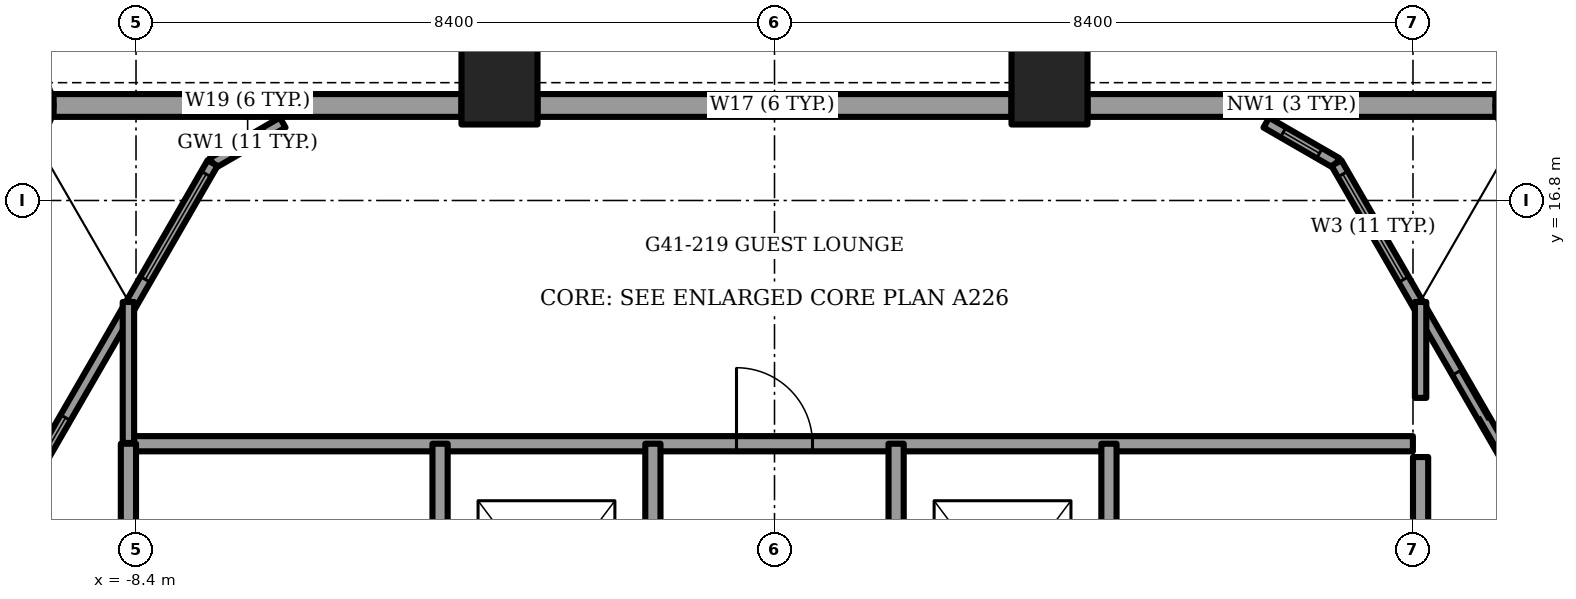
"""IFC4 building model, lengths in metres.
Left out: names, types, materials, properties, quantities, classifications, styles, units other than length and angle.
Written with IfcOpenShell. Run it as: python <this file> out.ifc"""

import sys

from ifc_helpers import new_model, si_unit, direction, frame, frame_2d, origin, origin_2d, place, context, subcontext, project, spatial, rectangle, circle, extrude, element, fill, save


model = new_model("IFC4")
c1 = context("Model", 3, precision=1e-05, world=origin(), true_north=direction((0.0, 1.0)))
c2 = subcontext(c1, "Body", "Model", "MODEL_VIEW")
j1 = project(units=[si_unit("LENGTHUNIT", "METRE"), si_unit("PLANEANGLEUNIT", "RADIAN")], contexts=[c1])
p1 = place(None, origin())
s1 = spatial("IfcSite", under=j1, at=p1, CompositionType="ELEMENT")
p2 = place(p1, origin())
s2 = spatial("IfcBuilding", under=s1, at=p2, CompositionType="ELEMENT")
p3 = place(p2, frame((0.0, 0.0, 168.25)))
s3 = spatial("IfcBuildingStorey", under=s2, at=p3, CompositionType="ELEMENT", Elevation=168.25)
for number, where, z_axis, x_axis in (
    (1, (-9.984, 18.045, -1.2), (0.0, 0.0, 1.0), (1.0, 0.0, 0.0)),
    (2, (9.984, 18.045, -1.2), (0.0, 0.0, 1.0), (1.0, 0.0, 0.0)),
):
    element("IfcColumn", number, at=place(p3, frame(where, z_axis=z_axis, x_axis=x_axis)), inside=s3, PredefinedType="COLUMN", context=c2, shape_type="SweptSolid", body=[
        extrude(circle(Radius=0.5, at=origin_2d()), origin(), (0.0, 0.0, 1.0), 3.75),
    ])
for number, where, z_axis, x_axis in (
    (3, (3.618, 18.3, -1.2), (0.0, 0.0, 1.0), (1.0, 0.0, 0.0)),
    (4, (-3.618, 18.3, -1.2), (0.0, 0.0, 1.0), (1.0, 0.0, 0.0)),
):
    element("IfcColumn", number, at=place(p3, frame(where, z_axis=z_axis, x_axis=x_axis)), inside=s3, PredefinedType="COLUMN", context=c2, shape_type="SweptSolid", body=[
        extrude(rectangle(XDim=1.0, YDim=1.0, at=origin_2d()), origin(), (0.0, 0.0, 1.0), 3.75),
    ])
p4 = place(p3, frame((9.484, 18.05, 0.0), z_axis=(0.0, 0.0, 1.0), x_axis=(-1.0, 0.0, 0.0)))
e5 = element("IfcWall", 5, at=p4, inside=s3, PredefinedType="SOLIDWALL", context=c2, shape_type="SweptSolid", body=[
    extrude(rectangle(XDim=5.366, YDim=0.3, at=frame_2d((2.683, 0.0))), origin(), (0.0, 0.0, 1.0), 2.55),
])
p5 = place(p3, frame((3.118, 18.05, 0.0), z_axis=(0.0, 0.0, 1.0), x_axis=(-1.0, 0.0, 0.0)))
e6 = element("IfcWall", 6, at=p5, inside=s3, PredefinedType="SOLIDWALL", context=c2, shape_type="SweptSolid", body=[
    extrude(rectangle(XDim=6.236, YDim=0.3, at=frame_2d((3.118, 0.0))), origin(), (0.0, 0.0, 1.0), 2.55),
])
p6 = place(p5, frame((2.7, 0.0, 0.15)))
e7 = element("IfcOpeningElement", 7, at=p6, cuts=e6, PredefinedType="OPENING", context=c2, shape_type="SweptSolid", body=[
    extrude(rectangle(XDim=0.9, YDim=2.15, at=frame_2d((0.45, 1.075))), frame((0.0, 0.15, 0.0), z_axis=(0.0, -1.0, 0.0), x_axis=(1.0, 0.0, 0.0)), (0.0, 0.0, 1.0), 0.3),
])
p7 = place(p3, frame((-4.118, 18.05, 0.0), z_axis=(0.0, 0.0, 1.0), x_axis=(-1.0, 0.0, 0.0)))
e8 = element("IfcWall", 8, at=p7, inside=s3, PredefinedType="SOLIDWALL", context=c2, shape_type="SweptSolid", body=[
    extrude(rectangle(XDim=5.366, YDim=0.3, at=frame_2d((2.683, 0.0))), origin(), (0.0, 0.0, 1.0), 2.55),
])
p8 = place(p3, frame((-7.393, 17.292, 0.0), z_axis=(0.0, 0.0, 1.0), x_axis=(-0.500001917853, -0.866024296509, 0.0)))
e9 = element("IfcWall", 9, at=p8, inside=s3, PredefinedType="SOLIDWALL", context=c2, shape_type="SweptSolid", body=[
    extrude(rectangle(XDim=19.788, YDim=0.15, at=frame_2d((9.894, 0.0))), origin(), (0.0, 0.0, 1.0), 3.45),
])
p9 = place(p8, frame((3.868, 0.0, 0.15)))
e10 = element("IfcOpeningElement", 10, at=p9, cuts=e9, PredefinedType="OPENING", context=c2, shape_type="SweptSolid", body=[
    extrude(rectangle(XDim=1.4, YDim=2.85, at=frame_2d((0.7, 1.425))), frame((0.0, 0.075, 0.0), z_axis=(0.0, -1.0, 0.0), x_axis=(1.0, 0.0, 0.0)), (0.0, 0.0, 1.0), 0.15),
])
p10 = place(p8, frame((10.067, 0.0, 0.15)))
e11 = element("IfcOpeningElement", 11, at=p10, cuts=e9, PredefinedType="OPENING", context=c2, shape_type="SweptSolid", body=[
    extrude(rectangle(XDim=0.9, YDim=2.85, at=frame_2d((0.45, 1.425))), frame((0.0, 0.075, 0.0), z_axis=(0.0, -1.0, 0.0), x_axis=(1.0, 0.0, 0.0)), (0.0, 0.0, 1.0), 0.15),
])
p11 = place(p8, frame((7.967, 0.0, 0.15)))
e12 = element("IfcOpeningElement", 12, at=p11, cuts=e9, PredefinedType="OPENING", context=c2, shape_type="SweptSolid", body=[
    extrude(rectangle(XDim=1.4, YDim=2.85, at=frame_2d((0.7, 1.425))), frame((0.0, 0.075, 0.0), z_axis=(0.0, -1.0, 0.0), x_axis=(1.0, 0.0, 0.0)), (0.0, 0.0, 1.0), 0.15),
])
p12 = place(p8, frame((13.779, 0.0, 0.0)))
e13 = element("IfcOpeningElement", 13, at=p12, cuts=e9, PredefinedType="OPENING", context=c2, shape_type="SweptSolid", body=[
    extrude(rectangle(XDim=1.4, YDim=2.4, at=frame_2d((0.7, 1.2))), frame((0.0, 0.075, 0.0), z_axis=(0.0, -1.0, 0.0), x_axis=(1.0, 0.0, 0.0)), (0.0, 0.0, 1.0), 0.15),
])
p13 = place(p8, frame((17.979, 0.0, 0.0)))
e14 = element("IfcOpeningElement", 14, at=p13, cuts=e9, PredefinedType="OPENING", context=c2, shape_type="SweptSolid", body=[
    extrude(rectangle(XDim=1.4, YDim=2.4, at=frame_2d((0.7, 1.2))), frame((0.0, 0.075, 0.0), z_axis=(0.0, -1.0, 0.0), x_axis=(1.0, 0.0, 0.0)), (0.0, 0.0, 1.0), 0.15),
])
p14 = place(p8, frame((0.168, 0.0, 0.15)))
e15 = element("IfcOpeningElement", 15, at=p14, cuts=e9, PredefinedType="OPENING", context=c2, shape_type="SweptSolid", body=[
    extrude(rectangle(XDim=1.6, YDim=2.73, at=frame_2d((0.8, 1.365))), frame((0.0, 0.075, 0.0), z_axis=(0.0, -1.0, 0.0), x_axis=(1.0, 0.0, 0.0)), (0.0, 0.0, 1.0), 0.15),
])
p15 = place(p3, frame((17.287, 0.156, 0.0), z_axis=(0.0, 0.0, 1.0), x_axis=(-0.500001917853, 0.866024296509, 0.0)))
e16 = element("IfcWall", 16, at=p15, inside=s3, PredefinedType="SOLIDWALL", context=c2, shape_type="SweptSolid", body=[
    extrude(rectangle(XDim=19.788, YDim=0.15, at=frame_2d((9.894, 0.0))), origin(), (0.0, 0.0, 1.0), 3.45),
])
p16 = place(p15, frame((1.046, 0.0, 0.15)))
e17 = element("IfcOpeningElement", 17, at=p16, cuts=e16, PredefinedType="OPENING", context=c2, shape_type="SweptSolid", body=[
    extrude(rectangle(XDim=1.4, YDim=2.85, at=frame_2d((0.7, 1.425))), frame((0.0, 0.075, 0.0), z_axis=(0.0, -1.0, 0.0), x_axis=(1.0, 0.0, 0.0)), (0.0, 0.0, 1.0), 0.15),
])
p17 = place(p15, frame((4.608, 0.0, 0.15)))
e18 = element("IfcOpeningElement", 18, at=p17, cuts=e16, PredefinedType="OPENING", context=c2, shape_type="SweptSolid", body=[
    extrude(rectangle(XDim=0.9, YDim=2.85, at=frame_2d((0.45, 1.425))), frame((0.0, 0.075, 0.0), z_axis=(0.0, -1.0, 0.0), x_axis=(1.0, 0.0, 0.0)), (0.0, 0.0, 1.0), 0.15),
])
p18 = place(p15, frame((5.896, 0.0, 0.15)))
e19 = element("IfcOpeningElement", 19, at=p18, cuts=e16, PredefinedType="OPENING", context=c2, shape_type="SweptSolid", body=[
    extrude(rectangle(XDim=1.4, YDim=2.85, at=frame_2d((0.7, 1.425))), frame((0.0, 0.075, 0.0), z_axis=(0.0, -1.0, 0.0), x_axis=(1.0, 0.0, 0.0)), (0.0, 0.0, 1.0), 0.15),
])
p19 = place(p15, frame((8.808, 0.0, 0.15)))
e20 = element("IfcOpeningElement", 20, at=p19, cuts=e16, PredefinedType="OPENING", context=c2, shape_type="SweptSolid", body=[
    extrude(rectangle(XDim=1.6, YDim=2.85, at=frame_2d((0.8, 1.425))), frame((0.0, 0.075, 0.0), z_axis=(0.0, -1.0, 0.0), x_axis=(1.0, 0.0, 0.0)), (0.0, 0.0, 1.0), 0.15),
])
p20 = place(p15, frame((11.008, 0.0, 0.15)))
e21 = element("IfcOpeningElement", 21, at=p20, cuts=e16, PredefinedType="OPENING", context=c2, shape_type="SweptSolid", body=[
    extrude(rectangle(XDim=1.4, YDim=2.85, at=frame_2d((0.7, 1.425))), frame((0.0, 0.075, 0.0), z_axis=(0.0, -1.0, 0.0), x_axis=(1.0, 0.0, 0.0)), (0.0, 0.0, 1.0), 0.15),
])
p21 = place(p15, frame((15.208, 0.0, 0.0)))
e22 = element("IfcOpeningElement", 22, at=p21, cuts=e16, PredefinedType="OPENING", context=c2, shape_type="SweptSolid", body=[
    extrude(rectangle(XDim=1.4, YDim=2.4, at=frame_2d((0.7, 1.2))), frame((0.0, 0.075, 0.0), z_axis=(0.0, -1.0, 0.0), x_axis=(1.0, 0.0, 0.0)), (0.0, 0.0, 1.0), 0.15),
])
p22 = place(p15, frame((18.019, 0.0, 0.15)))
e23 = element("IfcOpeningElement", 23, at=p22, cuts=e16, PredefinedType="OPENING", context=c2, shape_type="SweptSolid", body=[
    extrude(rectangle(XDim=1.6, YDim=2.73, at=frame_2d((0.8, 1.365))), frame((0.0, 0.075, 0.0), z_axis=(0.0, -1.0, 0.0), x_axis=(1.0, 0.0, 0.0)), (0.0, 0.0, 1.0), 0.15),
])
p23 = place(p3, frame((-6.47, 17.825, 0.0), z_axis=(0.0, 0.0, 1.0), x_axis=(-0.866048165231, -0.499960573946, 0.0)))
e24 = element("IfcWall", 24, at=p23, inside=s3, PredefinedType="SOLIDWALL", context=c2, shape_type="SweptSolid", body=[
    extrude(rectangle(XDim=1.065, YDim=0.15, at=frame_2d((0.532, 0.0))), origin(), (0.0, 0.0, 1.0), 3.45),
])
p24 = place(p23, frame((0.258, 0.0, 0.15)))
e25 = element("IfcOpeningElement", 25, at=p24, cuts=e24, PredefinedType="OPENING", context=c2, shape_type="SweptSolid", body=[
    extrude(rectangle(XDim=0.55, YDim=2.85, at=frame_2d((0.275, 1.425))), frame((0.0, 0.075, 0.0), z_axis=(0.0, -1.0, 0.0), x_axis=(1.0, 0.0, 0.0)), (0.0, 0.0, 1.0), 0.15),
])
p25 = place(p3, frame((7.393, 17.292, 0.0), z_axis=(0.0, 0.0, 1.0), x_axis=(-0.866048165231, 0.499960573946, 0.0)))
e26 = element("IfcWall", 26, at=p25, inside=s3, PredefinedType="SOLIDWALL", context=c2, shape_type="SweptSolid", body=[
    extrude(rectangle(XDim=1.065, YDim=0.15, at=frame_2d((0.532, 0.0))), origin(), (0.0, 0.0, 1.0), 3.45),
])
p26 = place(p25, frame((0.258, 0.0, 0.15)))
e27 = element("IfcOpeningElement", 27, at=p26, cuts=e26, PredefinedType="OPENING", context=c2, shape_type="SweptSolid", body=[
    extrude(rectangle(XDim=0.55, YDim=2.85, at=frame_2d((0.275, 1.425))), frame((0.0, 0.075, 0.0), z_axis=(0.0, -1.0, 0.0), x_axis=(1.0, 0.0, 0.0)), (0.0, 0.0, 1.0), 0.15),
])
p27 = place(p3, frame((-8.5, 13.6, 0.0), z_axis=(0.0, 0.0, 1.0), x_axis=(1.0, 0.0, 0.0)))
e28 = element("IfcWall", 28, at=p27, inside=s3, PredefinedType="PARTITIONING", context=c2, shape_type="SweptSolid", body=[
    extrude(rectangle(XDim=16.899, YDim=0.2, at=frame_2d((8.449, 0.0))), origin(), (0.0, 0.0, 1.0), 3.45),
])
p28 = place(p27, frame((8.0, 0.0, 0.0)))
e29 = element("IfcOpeningElement", 29, at=p28, cuts=e28, PredefinedType="OPENING", context=c2, shape_type="SweptSolid", body=[
    extrude(rectangle(XDim=1.0, YDim=2.1, at=frame_2d((0.5, 1.05))), frame((0.0, 0.1, 0.0), z_axis=(0.0, -1.0, 0.0), x_axis=(1.0, 0.0, 0.0)), (0.0, 0.0, 1.0), 0.2),
])
p29 = place(p3, frame((-8.5, 9.7, 0.0), z_axis=(0.0, 0.0, 1.0), x_axis=(0.0, 1.0, 0.0)))
e30 = element("IfcWall", 30, at=p29, inside=s3, PredefinedType="PARTITIONING", context=c2, shape_type="SweptSolid", body=[
    extrude(rectangle(XDim=3.9, YDim=0.2, at=frame_2d((1.95, 0.0))), origin(), (0.0, 0.0, 1.0), 3.45),
])
p30 = place(p29, frame((1.35, 0.0, 0.0)))
e31 = element("IfcOpeningElement", 31, at=p30, cuts=e30, PredefinedType="OPENING", context=c2, shape_type="SweptSolid", body=[
    extrude(rectangle(XDim=1.2, YDim=2.1, at=frame_2d((0.6, 1.05))), frame((0.0, 0.1, 0.0), z_axis=(0.0, -1.0, 0.0), x_axis=(1.0, 0.0, 0.0)), (0.0, 0.0, 1.0), 0.2),
])
p31 = place(p3, frame((8.5, 9.7, 0.0), z_axis=(0.0, 0.0, 1.0), x_axis=(0.0, 1.0, 0.0)))
e32 = element("IfcWall", 32, at=p31, inside=s3, PredefinedType="PARTITIONING", context=c2, shape_type="SweptSolid", body=[
    extrude(rectangle(XDim=3.725, YDim=0.2, at=frame_2d((1.862, 0.0))), origin(), (0.0, 0.0, 1.0), 3.45),
])
p32 = place(p31, frame((1.35, 0.0, 0.0)))
e33 = element("IfcOpeningElement", 33, at=p32, cuts=e32, PredefinedType="OPENING", context=c2, shape_type="SweptSolid", body=[
    extrude(rectangle(XDim=1.2, YDim=2.1, at=frame_2d((0.6, 1.05))), frame((0.0, 0.1, 0.0), z_axis=(0.0, -1.0, 0.0), x_axis=(1.0, 0.0, 0.0)), (0.0, 0.0, 1.0), 0.2),
])
p33 = place(p3, frame((-4.4, 9.7, 0.0), z_axis=(0.0, 0.0, 1.0), x_axis=(0.0, 1.0, 0.0)))
e34 = element("IfcWall", 34, at=p33, inside=s3, PredefinedType="PARTITIONING", context=c2, shape_type="SweptSolid", body=[
    extrude(rectangle(XDim=3.9, YDim=0.2, at=frame_2d((1.95, 0.0))), origin(), (0.0, 0.0, 1.0), 3.45),
])
p34 = place(p33, frame((1.35, 0.0, 0.0)))
e35 = element("IfcOpeningElement", 35, at=p34, cuts=e34, PredefinedType="OPENING", context=c2, shape_type="SweptSolid", body=[
    extrude(rectangle(XDim=1.2, YDim=2.1, at=frame_2d((0.6, 1.05))), frame((0.0, 0.1, 0.0), z_axis=(0.0, -1.0, 0.0), x_axis=(1.0, 0.0, 0.0)), (0.0, 0.0, 1.0), 0.2),
])
p35 = place(p3, frame((4.4, 9.7, 0.0), z_axis=(0.0, 0.0, 1.0), x_axis=(0.0, 1.0, 0.0)))
e36 = element("IfcWall", 36, at=p35, inside=s3, PredefinedType="PARTITIONING", context=c2, shape_type="SweptSolid", body=[
    extrude(rectangle(XDim=3.9, YDim=0.2, at=frame_2d((1.95, 0.0))), origin(), (0.0, 0.0, 1.0), 3.45),
])
p36 = place(p35, frame((1.35, 0.0, 0.0)))
e37 = element("IfcOpeningElement", 37, at=p36, cuts=e36, PredefinedType="OPENING", context=c2, shape_type="SweptSolid", body=[
    extrude(rectangle(XDim=1.2, YDim=2.1, at=frame_2d((0.6, 1.05))), frame((0.0, 0.1, 0.0), z_axis=(0.0, -1.0, 0.0), x_axis=(1.0, 0.0, 0.0)), (0.0, 0.0, 1.0), 0.2),
])
for number, where, z_axis, x_axis in (
    (38, (-1.6, 9.7, 0.0), (0.0, 0.0, 1.0), (0.0, 1.0, 0.0)),
    (39, (1.6, 9.7, 0.0), (0.0, 0.0, 1.0), (0.0, 1.0, 0.0)),
):
    element("IfcWall", number, at=place(p3, frame(where, z_axis=z_axis, x_axis=x_axis)), inside=s3, PredefinedType="PARTITIONING", context=c2, shape_type="SweptSolid", body=[
        extrude(rectangle(XDim=3.9, YDim=0.2, at=frame_2d((1.95, 0.0))), origin(), (0.0, 0.0, 1.0), 3.45),
    ])
p37 = place(p3, frame((8.5, 14.203, 0.0), z_axis=(0.0, 0.0, 1.0), x_axis=(0.0, 1.0, 0.0)))
e40 = element("IfcWall", 40, at=p37, inside=s3, PredefinedType="PARTITIONING", context=c2, shape_type="SweptSolid", body=[
    extrude(rectangle(XDim=1.262, YDim=0.15, at=frame_2d((0.631, 0.0))), origin(), (0.0, 0.0, 1.0), 3.45),
])
p38 = place(p3, frame((-8.5, 13.61, 0.0), z_axis=(0.0, 0.0, 1.0), x_axis=(0.0, 1.0, 0.0)))
e41 = element("IfcWall", 41, at=p38, inside=s3, PredefinedType="PARTITIONING", context=c2, shape_type="SweptSolid", body=[
    extrude(rectangle(XDim=1.855, YDim=0.15, at=frame_2d((0.927, 0.0))), origin(), (0.0, 0.0, 1.0), 3.45),
])
p39 = place(p6, origin())
e42 = element("IfcWindow", 42, at=p39, inside=s3, PartitioningType="SINGLE_PANEL", PredefinedType="WINDOW", context=c2, shape_type="SweptSolid", body=[
    extrude(rectangle(XDim=0.9, YDim=2.15, at=frame_2d((0.45, 1.075))), frame((0.0, 0.03, 0.0), z_axis=(0.0, -1.0, 0.0), x_axis=(1.0, 0.0, 0.0)), (0.0, 0.0, 1.0), 0.06),
])
fill(e7, e42)
p40 = place(p9, origin())
e43 = element("IfcWindow", 43, at=p40, inside=s3, PartitioningType="SINGLE_PANEL", PredefinedType="WINDOW", context=c2, shape_type="SweptSolid", body=[
    extrude(rectangle(XDim=1.4, YDim=2.85, at=frame_2d((0.7, 1.425))), frame((0.0, 0.03, 0.0), z_axis=(0.0, -1.0, 0.0), x_axis=(1.0, 0.0, 0.0)), (0.0, 0.0, 1.0), 0.06),
])
fill(e10, e43)
p41 = place(p14, origin())
e44 = element("IfcWindow", 44, at=p41, inside=s3, PartitioningType="SINGLE_PANEL", PredefinedType="WINDOW", context=c2, shape_type="SweptSolid", body=[
    extrude(rectangle(XDim=1.6, YDim=2.73, at=frame_2d((0.8, 1.365))), frame((0.0, 0.03, 0.0), z_axis=(0.0, -1.0, 0.0), x_axis=(1.0, 0.0, 0.0)), (0.0, 0.0, 1.0), 0.06),
])
fill(e15, e44)
p42 = place(p21, origin())
e45 = element("IfcDoor", 45, at=p42, inside=s3, OperationType="SLIDING_TO_RIGHT", PredefinedType="DOOR", context=c2, shape_type="SweptSolid", body=[
    extrude(rectangle(XDim=1.4, YDim=2.4, at=frame_2d((0.7, 1.2))), frame((0.0, 0.025, 0.0), z_axis=(0.0, -1.0, 0.0), x_axis=(1.0, 0.0, 0.0)), (0.0, 0.0, 1.0), 0.05),
])
fill(e22, e45)
p43 = place(p22, origin())
e46 = element("IfcWindow", 46, at=p43, inside=s3, PartitioningType="SINGLE_PANEL", PredefinedType="WINDOW", context=c2, shape_type="SweptSolid", body=[
    extrude(rectangle(XDim=1.6, YDim=2.73, at=frame_2d((0.8, 1.365))), frame((0.0, 0.03, 0.0), z_axis=(0.0, -1.0, 0.0), x_axis=(1.0, 0.0, 0.0)), (0.0, 0.0, 1.0), 0.06),
])
fill(e23, e46)
p44 = place(p24, origin())
e47 = element("IfcWindow", 47, at=p44, inside=s3, PartitioningType="SINGLE_PANEL", PredefinedType="WINDOW", context=c2, shape_type="SweptSolid", body=[
    extrude(rectangle(XDim=0.55, YDim=2.85, at=frame_2d((0.275, 1.425))), frame((0.0, 0.03, 0.0), z_axis=(0.0, -1.0, 0.0), x_axis=(1.0, 0.0, 0.0)), (0.0, 0.0, 1.0), 0.06),
])
fill(e25, e47)
p45 = place(p26, origin())
e48 = element("IfcWindow", 48, at=p45, inside=s3, PartitioningType="SINGLE_PANEL", PredefinedType="WINDOW", context=c2, shape_type="SweptSolid", body=[
    extrude(rectangle(XDim=0.55, YDim=2.85, at=frame_2d((0.275, 1.425))), frame((0.0, 0.03, 0.0), z_axis=(0.0, -1.0, 0.0), x_axis=(1.0, 0.0, 0.0)), (0.0, 0.0, 1.0), 0.06),
])
fill(e27, e48)
p46 = place(p28, origin())
e49 = element("IfcDoor", 49, at=p46, inside=s3, OperationType="SINGLE_SWING_LEFT", PredefinedType="DOOR", context=c2, shape_type="SweptSolid", body=[
    extrude(rectangle(XDim=1.0, YDim=2.1, at=frame_2d((0.5, 1.05))), frame((0.0, 0.025, 0.0), z_axis=(0.0, -1.0, 0.0), x_axis=(1.0, 0.0, 0.0)), (0.0, 0.0, 1.0), 0.05),
])
fill(e29, e49)
save(model, sys.argv[1])
